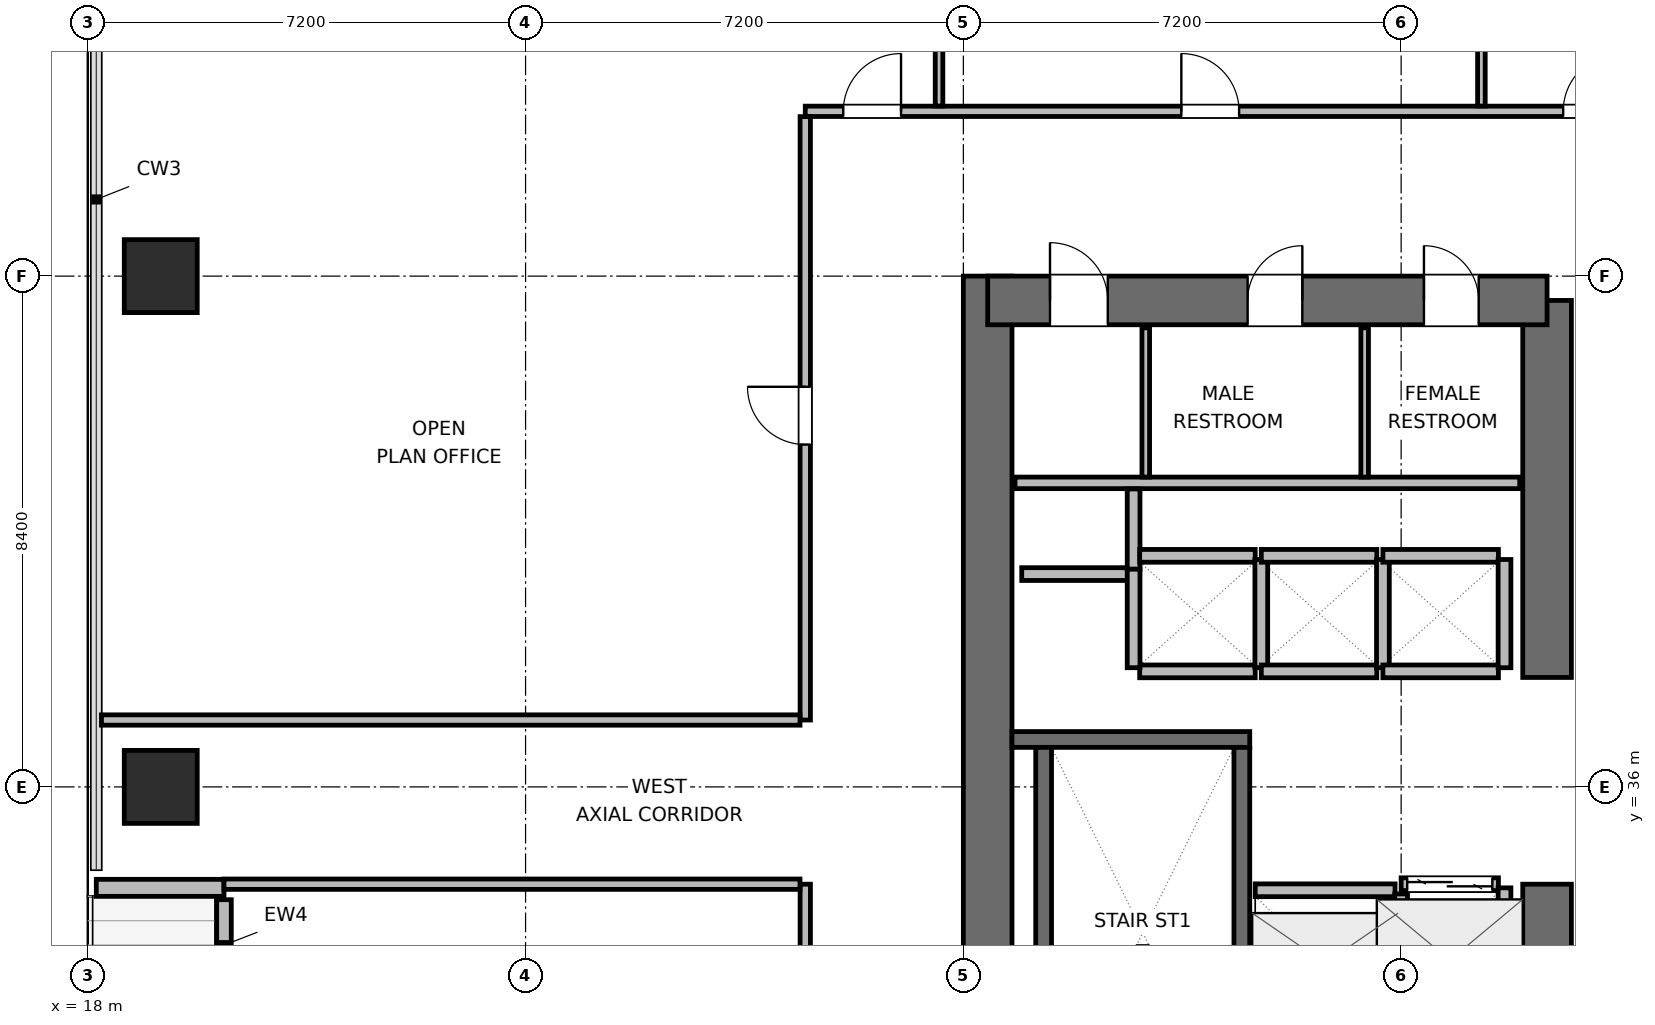
"""IFC4 building model, lengths in metres.
Left out: names, types, materials, properties, quantities, classifications, styles, units other than length and angle.
Written with IfcOpenShell. Run it as: python <this file> out.ifc"""

import sys

from ifc_helpers import new_model, si_unit, direction, frame, frame_2d, origin, origin_2d, place, context, subcontext, project, spatial, rectangle, extrude, element, fill, save


model = new_model("IFC4")
c1 = context("Model", 3, precision=1e-05, world=origin(), true_north=direction((0.0, 1.0)))
c2 = subcontext(c1, "Body", "Model", "MODEL_VIEW")
j1 = project(units=[si_unit("LENGTHUNIT", "METRE"), si_unit("PLANEANGLEUNIT", "RADIAN")], contexts=[c1])
p1 = place(None, origin())
s1 = spatial("IfcSite", under=j1, at=p1, CompositionType="ELEMENT")
p2 = place(p1, origin())
s2 = spatial("IfcBuilding", under=s1, at=p2, CompositionType="ELEMENT")
p3 = place(p2, frame((0.0, 0.0, 166.2)))
s3 = spatial("IfcBuildingStorey", under=s2, at=p3, CompositionType="ELEMENT", Elevation=166.2)
p4 = place(p3, frame((32.8, 27.6, 0.0), z_axis=(0.0, 0.0, 1.0), x_axis=(0.0, 1.0, 0.0)))
e1 = element("IfcWall", 1, at=p4, inside=s3, PredefinedType="SHEAR", context=c2, shape_type="SweptSolid", body=[
    extrude(rectangle(XDim=16.8, YDim=0.8, at=frame_2d((8.4, 0.0))), origin(), (0.0, 0.0, 1.0), 3.9),
])
p5 = place(p3, frame((42.0, 28.0, 0.0), z_axis=(0.0, 0.0, 1.0), x_axis=(0.0, 1.0, 0.0)))
e2 = element("IfcWall", 2, at=p5, inside=s3, PredefinedType="SHEAR", context=c2, shape_type="SweptSolid", body=[
    extrude(rectangle(XDim=6.4, YDim=0.8, at=frame_2d((3.2, 0.0))), origin(), (0.0, 0.0, 1.0), 3.9),
])
p6 = place(p3, frame((42.0, 37.8, 0.0), z_axis=(0.0, 0.0, 1.0), x_axis=(0.0, 1.0, 0.0)))
e3 = element("IfcWall", 3, at=p6, inside=s3, PredefinedType="SHEAR", context=c2, shape_type="SweptSolid", body=[
    extrude(rectangle(XDim=6.2, YDim=0.8, at=frame_2d((3.1, 0.0))), origin(), (0.0, 0.0, 1.0), 3.9),
])
p7 = place(p3, frame((32.8, 44.0, 0.0), z_axis=(0.0, 0.0, 1.0), x_axis=(1.0, 0.0, 0.0)))
e4 = element("IfcWall", 4, at=p7, inside=s3, PredefinedType="SHEAR", context=c2, shape_type="SweptSolid", body=[
    extrude(rectangle(XDim=9.2, YDim=0.8, at=frame_2d((4.6, 0.0))), origin(), (0.0, 0.0, 1.0), 3.9),
])
p8 = place(p7, frame((1.025, 0.0, 0.0)))
e5 = element("IfcOpeningElement", 5, at=p8, cuts=e4, PredefinedType="OPENING", context=c2, shape_type="SweptSolid", body=[
    extrude(rectangle(XDim=0.95, YDim=2.04, at=frame_2d((0.475, 1.02))), frame((0.0, 0.41, 0.0), z_axis=(0.0, -1.0, 0.0), x_axis=(1.0, 0.0, 0.0)), (0.0, 0.0, 1.0), 0.82),
])
p9 = place(p7, frame((4.275, 0.0, 0.0)))
e6 = element("IfcOpeningElement", 6, at=p9, cuts=e4, PredefinedType="OPENING", context=c2, shape_type="SweptSolid", body=[
    extrude(rectangle(XDim=0.9, YDim=2.02, at=frame_2d((0.45, 1.01))), frame((0.0, 0.41, 0.0), z_axis=(0.0, -1.0, 0.0), x_axis=(1.0, 0.0, 0.0)), (0.0, 0.0, 1.0), 0.82),
])
p10 = place(p7, frame((7.175, 0.0, 0.0)))
e7 = element("IfcOpeningElement", 7, at=p10, cuts=e4, PredefinedType="OPENING", context=c2, shape_type="SweptSolid", body=[
    extrude(rectangle(XDim=0.9, YDim=2.02, at=frame_2d((0.45, 1.01))), frame((0.0, 0.41, 0.0), z_axis=(0.0, -1.0, 0.0), x_axis=(1.0, 0.0, 0.0)), (0.0, 0.0, 1.0), 0.82),
])
p11 = place(p3, frame((33.2, 36.78, 0.0), z_axis=(0.0, 0.0, 1.0), x_axis=(1.0, 0.0, 0.0)))
e8 = element("IfcWall", 8, at=p11, inside=s3, PredefinedType="SHEAR", context=c2, shape_type="SweptSolid", body=[
    extrude(rectangle(XDim=3.91, YDim=0.26, at=frame_2d((1.955, 0.0))), origin(), (0.0, 0.0, 1.0), 3.9),
])
p12 = place(p3, frame((33.72, 29.05, 0.0), z_axis=(0.0, 0.0, 1.0), x_axis=(0.0, 1.0, 0.0)))
e9 = element("IfcWall", 9, at=p12, inside=s3, PredefinedType="SHEAR", context=c2, shape_type="SweptSolid", body=[
    extrude(rectangle(XDim=7.6, YDim=0.26, at=frame_2d((3.8, 0.0))), origin(), (0.0, 0.0, 1.0), 3.9),
])
p13 = place(p3, frame((36.98, 29.05, 0.0), z_axis=(0.0, 0.0, 1.0), x_axis=(0.0, 1.0, 0.0)))
e10 = element("IfcWall", 10, at=p13, inside=s3, PredefinedType="SHEAR", context=c2, shape_type="SweptSolid", body=[
    extrude(rectangle(XDim=7.6, YDim=0.26, at=frame_2d((3.8, 0.0))), origin(), (0.0, 0.0, 1.0), 3.9),
])
p14 = place(p13, frame((0.3, 0.0, 0.0)))
e11 = element("IfcOpeningElement", 11, at=p14, cuts=e10, PredefinedType="OPENING", context=c2, shape_type="SweptSolid", body=[
    extrude(rectangle(XDim=1.0, YDim=2.04, at=frame_2d((0.5, 1.02))), frame((0.0, 0.14, 0.0), z_axis=(0.0, -1.0, 0.0), x_axis=(1.0, 0.0, 0.0)), (0.0, 0.0, 1.0), 0.28),
])
for number, where, z_axis, x_axis in (
    (12, (19.2, 36.0, 0.0), (0.0, 0.0, 1.0), (1.0, 0.0, 0.0)),
    (13, (19.2, 44.4, 0.0), (0.0, 0.0, 1.0), (1.0, 0.0, 0.0)),
):
    element("IfcColumn", number, at=place(p3, frame(where, z_axis=z_axis, x_axis=x_axis)), inside=s3, PredefinedType="COLUMN", context=c2, shape_type="SweptSolid", body=[
        extrude(rectangle(XDim=1.2, YDim=1.2, at=origin_2d()), origin(), (0.0, 0.0, 1.0), 3.9),
    ])
p15 = place(p3, frame((20.24, 29.455, 0.0), z_axis=(0.0, 0.0, 1.0), x_axis=(0.0, 1.0, 0.0)))
e14 = element("IfcWall", 14, at=p15, inside=s3, PredefinedType="SOLIDWALL", context=c2, shape_type="SweptSolid", body=[
    extrude(rectangle(XDim=4.69, YDim=0.24, at=frame_2d((2.345, 0.0))), origin(), (0.0, 0.0, 1.0), 3.248),
])
p16 = place(p15, frame((1.845, 0.0, 0.0)))
e15 = element("IfcOpeningElement", 15, at=p16, cuts=e14, PredefinedType="OPENING", context=c2, shape_type="SweptSolid", body=[
    extrude(rectangle(XDim=1.0, YDim=2.02, at=frame_2d((0.5, 1.01))), frame((0.0, 0.13, 0.0), z_axis=(0.0, -1.0, 0.0), x_axis=(1.0, 0.0, 0.0)), (0.0, 0.0, 1.0), 0.26),
])
p17 = place(p3, frame((20.24, 34.34, 0.0), z_axis=(0.0, 0.0, 1.0), x_axis=(-1.0, 0.0, 0.0)))
e16 = element("IfcWall", 16, at=p17, inside=s3, PredefinedType="SOLIDWALL", context=c2, shape_type="SweptSolid", body=[
    extrude(rectangle(XDim=2.1, YDim=0.28, at=frame_2d((1.05, 0.0))), origin(), (0.0, 0.0, 1.0), 3.116),
])
p18 = place(p3, frame((33.25, 41.0, 0.0), z_axis=(0.0, 0.0, 1.0), x_axis=(1.0, 0.0, 0.0)))
e17 = element("IfcWall", 17, at=p18, inside=s3, PredefinedType="PLUMBINGWALL", context=c2, shape_type="SweptSolid", body=[
    extrude(rectangle(XDim=8.3, YDim=0.19, at=frame_2d((4.15, 0.0))), origin(), (0.0, 0.0, 1.0), 3.68),
])
for number, where, z_axis, x_axis in (
    (18, (35.4, 41.095, 0.0), (0.0, 0.0, 1.0), (0.0, 1.0, 0.0)),
    (19, (39.0, 41.095, 0.0), (0.0, 0.0, 1.0), (0.0, 1.0, 0.0)),
):
    element("IfcWall", number, at=place(p3, frame(where, z_axis=z_axis, x_axis=x_axis)), inside=s3, PredefinedType="PARTITIONING", context=c2, shape_type="SweptSolid", body=[
        extrude(rectangle(XDim=2.455, YDim=0.125, at=frame_2d((1.228, 0.0))), origin(), (0.0, 0.0, 1.0), 3.68),
    ])
p19 = place(p3, frame((33.36, 39.5, 0.0), z_axis=(0.0, 0.0, 1.0), x_axis=(1.0, 0.0, 0.0)))
e20 = element("IfcWall", 20, at=p19, inside=s3, PredefinedType="PARTITIONING", context=c2, shape_type="SweptSolid", body=[
    extrude(rectangle(XDim=1.86, YDim=0.21, at=frame_2d((0.93, 0.0))), origin(), (0.0, 0.0, 1.0), 3.68),
])
p20 = place(p3, frame((35.2, 39.58, 0.0), z_axis=(0.0, 0.0, 1.0), x_axis=(0.0, 1.0, 0.0)))
e21 = element("IfcWall", 21, at=p20, inside=s3, PredefinedType="PARTITIONING", context=c2, shape_type="SweptSolid", body=[
    extrude(rectangle(XDim=1.32, YDim=0.21, at=frame_2d((0.66, 0.0))), origin(), (0.0, 0.0, 1.0), 3.68),
])
p21 = place(p3, frame((37.2, 34.3, 0.0), z_axis=(0.0, 0.0, 1.0), x_axis=(1.0, 0.0, 0.0)))
e22 = element("IfcWall", 22, at=p21, inside=s3, PredefinedType="PARTITIONING", context=c2, shape_type="SweptSolid", body=[
    extrude(rectangle(XDim=2.3, YDim=0.21, at=frame_2d((1.15, 0.0))), origin(), (0.0, 0.0, 1.0), 3.68),
])
p22 = place(p3, frame((39.6, 31.96, 0.0), z_axis=(0.0, 0.0, 1.0), x_axis=(0.0, 1.0, 0.0)))
e23 = element("IfcWall", 23, at=p22, inside=s3, PredefinedType="PARTITIONING", context=c2, shape_type="SweptSolid", body=[
    extrude(rectangle(XDim=2.28, YDim=0.21, at=frame_2d((1.14, 0.0))), origin(), (0.0, 0.0, 1.0), 3.68),
])
p23 = place(p3, frame((39.6, 34.4, 0.0), z_axis=(0.0, 0.0, 1.0), x_axis=(1.0, 0.0, 0.0)))
e24 = element("IfcWall", 24, at=p23, inside=s3, PredefinedType="PARTITIONING", context=c2, shape_type="SweptSolid", body=[
    extrude(rectangle(XDim=1.6, YDim=0.21, at=frame_2d((0.8, 0.0))), origin(), (0.0, 0.0, 1.0), 3.68),
])
p24 = place(p23, frame((0.1, 0.0, 0.0)))
e25 = element("IfcOpeningElement", 25, at=p24, cuts=e24, PredefinedType="OPENING", context=c2, shape_type="SweptSolid", body=[
    extrude(rectangle(XDim=1.4, YDim=2.06, at=frame_2d((0.7, 1.03))), frame((0.0, 0.115, 0.0), z_axis=(0.0, -1.0, 0.0), x_axis=(1.0, 0.0, 0.0)), (0.0, 0.0, 1.0), 0.23),
])
p25 = place(p3, frame((41.3, 31.96, 0.0), z_axis=(0.0, 0.0, 1.0), x_axis=(0.0, 1.0, 0.0)))
e26 = element("IfcWall", 26, at=p25, inside=s3, PredefinedType="PARTITIONING", context=c2, shape_type="SweptSolid", body=[
    extrude(rectangle(XDim=2.38, YDim=0.21, at=frame_2d((1.19, 0.0))), origin(), (0.0, 0.0, 1.0), 3.68),
])
for number, where, z_axis, x_axis in (
    (27, (35.3, 37.9, 0.0), (0.0, 0.0, 1.0), (1.0, 0.0, 0.0)),
    (28, (35.3, 39.8, 0.0), (0.0, 0.0, 1.0), (1.0, 0.0, 0.0)),
):
    element("IfcWall", number, at=place(p3, frame(where, z_axis=z_axis, x_axis=x_axis)), inside=s3, PredefinedType="PARTITIONING", context=c2, shape_type="SweptSolid", body=[
        extrude(rectangle(XDim=1.9, YDim=0.21, at=frame_2d((0.95, 0.0))), origin(), (0.0, 0.0, 1.0), 3.68),
    ])
p26 = place(p3, frame((35.2, 37.96, 0.0), z_axis=(0.0, 0.0, 1.0), x_axis=(0.0, 1.0, 0.0)))
e29 = element("IfcWall", 29, at=p26, inside=s3, PredefinedType="PARTITIONING", context=c2, shape_type="SweptSolid", body=[
    extrude(rectangle(XDim=1.62, YDim=0.21, at=frame_2d((0.81, 0.0))), origin(), (0.0, 0.0, 1.0), 3.68),
])
p27 = place(p3, frame((37.3, 37.96, 0.0), z_axis=(0.0, 0.0, 1.0), x_axis=(0.0, 1.0, 0.0)))
e30 = element("IfcWall", 30, at=p27, inside=s3, PredefinedType="PARTITIONING", context=c2, shape_type="SweptSolid", body=[
    extrude(rectangle(XDim=1.78, YDim=0.21, at=frame_2d((0.89, 0.0))), origin(), (0.0, 0.0, 1.0), 3.68),
])
for number, where, z_axis, x_axis in (
    (31, (37.3, 37.9, 0.0), (0.0, 0.0, 1.0), (1.0, 0.0, 0.0)),
    (32, (37.3, 39.8, 0.0), (0.0, 0.0, 1.0), (1.0, 0.0, 0.0)),
):
    element("IfcWall", number, at=place(p3, frame(where, z_axis=z_axis, x_axis=x_axis)), inside=s3, PredefinedType="PARTITIONING", context=c2, shape_type="SweptSolid", body=[
        extrude(rectangle(XDim=1.9, YDim=0.21, at=frame_2d((0.95, 0.0))), origin(), (0.0, 0.0, 1.0), 3.68),
    ])
p28 = place(p3, frame((39.3, 37.96, 0.0), z_axis=(0.0, 0.0, 1.0), x_axis=(0.0, 1.0, 0.0)))
e33 = element("IfcWall", 33, at=p28, inside=s3, PredefinedType="PARTITIONING", context=c2, shape_type="SweptSolid", body=[
    extrude(rectangle(XDim=1.78, YDim=0.21, at=frame_2d((0.89, 0.0))), origin(), (0.0, 0.0, 1.0), 3.68),
])
for number, where, z_axis, x_axis in (
    (34, (39.3, 37.9, 0.0), (0.0, 0.0, 1.0), (1.0, 0.0, 0.0)),
    (35, (39.3, 39.8, 0.0), (0.0, 0.0, 1.0), (1.0, 0.0, 0.0)),
):
    element("IfcWall", number, at=place(p3, frame(where, z_axis=z_axis, x_axis=x_axis)), inside=s3, PredefinedType="PARTITIONING", context=c2, shape_type="SweptSolid", body=[
        extrude(rectangle(XDim=1.9, YDim=0.21, at=frame_2d((0.95, 0.0))), origin(), (0.0, 0.0, 1.0), 3.68),
    ])
p29 = place(p3, frame((41.3, 37.96, 0.0), z_axis=(0.0, 0.0, 1.0), x_axis=(0.0, 1.0, 0.0)))
e36 = element("IfcWall", 36, at=p29, inside=s3, PredefinedType="PARTITIONING", context=c2, shape_type="SweptSolid", body=[
    extrude(rectangle(XDim=1.78, YDim=0.21, at=frame_2d((0.89, 0.0))), origin(), (0.0, 0.0, 1.0), 3.68),
])
p30 = place(p3, frame((29.8, 47.11, 0.0), z_axis=(0.0, 0.0, 1.0), x_axis=(1.0, 0.0, 0.0)))
e37 = element("IfcWall", 37, at=p30, inside=s3, PredefinedType="PARTITIONING", context=c2, shape_type="SweptSolid", body=[
    extrude(rectangle(XDim=33.8, YDim=0.17, at=frame_2d((16.9, 0.0))), origin(), (0.0, 0.0, 1.0), 3.68),
])
p31 = place(p30, frame((0.625, 0.0, 0.0)))
e38 = element("IfcOpeningElement", 38, at=p31, cuts=e37, PredefinedType="OPENING", context=c2, shape_type="SweptSolid", body=[
    extrude(rectangle(XDim=0.95, YDim=2.04, at=frame_2d((0.475, 1.02))), frame((0.0, 0.095, 0.0), z_axis=(0.0, -1.0, 0.0), x_axis=(1.0, 0.0, 0.0)), (0.0, 0.0, 1.0), 0.19),
])
p32 = place(p30, frame((6.185, 0.0, 0.0)))
e39 = element("IfcOpeningElement", 39, at=p32, cuts=e37, PredefinedType="OPENING", context=c2, shape_type="SweptSolid", body=[
    extrude(rectangle(XDim=0.95, YDim=2.04, at=frame_2d((0.475, 1.02))), frame((0.0, 0.095, 0.0), z_axis=(0.0, -1.0, 0.0), x_axis=(1.0, 0.0, 0.0)), (0.0, 0.0, 1.0), 0.19),
])
p33 = place(p30, frame((12.465, 0.0, 0.0)))
e40 = element("IfcOpeningElement", 40, at=p33, cuts=e37, PredefinedType="OPENING", context=c2, shape_type="SweptSolid", body=[
    extrude(rectangle(XDim=0.95, YDim=2.04, at=frame_2d((0.475, 1.02))), frame((0.0, 0.095, 0.0), z_axis=(0.0, -1.0, 0.0), x_axis=(1.0, 0.0, 0.0)), (0.0, 0.0, 1.0), 0.19),
])
p34 = place(p30, frame((20.065, 0.0, 0.0)))
e41 = element("IfcOpeningElement", 41, at=p34, cuts=e37, PredefinedType="OPENING", context=c2, shape_type="SweptSolid", body=[
    extrude(rectangle(XDim=0.95, YDim=2.04, at=frame_2d((0.475, 1.02))), frame((0.0, 0.095, 0.0), z_axis=(0.0, -1.0, 0.0), x_axis=(1.0, 0.0, 0.0)), (0.0, 0.0, 1.0), 0.19),
])
p35 = place(p30, frame((29.585, 0.0, 0.0)))
e42 = element("IfcOpeningElement", 42, at=p35, cuts=e37, PredefinedType="OPENING", context=c2, shape_type="SweptSolid", body=[
    extrude(rectangle(XDim=0.95, YDim=2.04, at=frame_2d((0.475, 1.02))), frame((0.0, 0.095, 0.0), z_axis=(0.0, -1.0, 0.0), x_axis=(1.0, 0.0, 0.0)), (0.0, 0.0, 1.0), 0.19),
])
p36 = place(p3, frame((29.8, 24.977, 0.0), z_axis=(0.0, 0.0, 1.0), x_axis=(0.0, 1.0, 0.0)))
e43 = element("IfcWall", 43, at=p36, inside=s3, PredefinedType="PARTITIONING", context=c2, shape_type="SweptSolid", body=[
    extrude(rectangle(XDim=9.423, YDim=0.17, at=frame_2d((4.711, 0.0))), origin(), (0.0, 0.0, 1.0), 3.68),
])
p37 = place(p36, frame((4.193, 0.0, 0.0)))
e44 = element("IfcOpeningElement", 44, at=p37, cuts=e43, PredefinedType="OPENING", context=c2, shape_type="SweptSolid", body=[
    extrude(rectangle(XDim=0.95, YDim=2.04, at=frame_2d((0.475, 1.02))), frame((0.0, 0.095, 0.0), z_axis=(0.0, -1.0, 0.0), x_axis=(1.0, 0.0, 0.0)), (0.0, 0.0, 1.0), 0.19),
])
p38 = place(p3, frame((29.8, 37.1, 0.0), z_axis=(0.0, 0.0, 1.0), x_axis=(0.0, 1.0, 0.0)))
e45 = element("IfcWall", 45, at=p38, inside=s3, PredefinedType="PARTITIONING", context=c2, shape_type="SweptSolid", body=[
    extrude(rectangle(XDim=9.923, YDim=0.17, at=frame_2d((4.961, 0.0))), origin(), (0.0, 0.0, 1.0), 3.68),
])
p39 = place(p38, frame((4.53, 0.0, 0.0)))
e46 = element("IfcOpeningElement", 46, at=p39, cuts=e45, PredefinedType="OPENING", context=c2, shape_type="SweptSolid", body=[
    extrude(rectangle(XDim=0.95, YDim=2.04, at=frame_2d((0.475, 1.02))), frame((0.0, 0.095, 0.0), z_axis=(0.0, -1.0, 0.0), x_axis=(1.0, 0.0, 0.0)), (0.0, 0.0, 1.0), 0.19),
])
p40 = place(p3, frame((32.0, 47.197, 0.0), z_axis=(0.0, 0.0, 1.0), x_axis=(0.0, 1.0, 0.0)))
e47 = element("IfcWall", 47, at=p40, inside=s3, PredefinedType="PARTITIONING", context=c2, shape_type="SweptSolid", body=[
    extrude(rectangle(XDim=14.968, YDim=0.125, at=frame_2d((7.484, 0.0))), origin(), (0.0, 0.0, 1.0), 3.68),
])
p41 = place(p3, frame((40.92, 47.197, 0.0), z_axis=(0.0, 0.0, 1.0), x_axis=(0.0, 1.0, 0.0)))
e48 = element("IfcWall", 48, at=p41, inside=s3, PredefinedType="PARTITIONING", context=c2, shape_type="SweptSolid", body=[
    extrude(rectangle(XDim=14.968, YDim=0.125, at=frame_2d((7.484, 0.0))), origin(), (0.0, 0.0, 1.0), 3.043),
])
p42 = place(p3, frame((20.24, 34.4, 0.0), z_axis=(0.0, 0.0, 1.0), x_axis=(1.0, 0.0, 0.0)))
e49 = element("IfcWall", 49, at=p42, inside=s3, PredefinedType="PARTITIONING", context=c2, shape_type="SweptSolid", body=[
    extrude(rectangle(XDim=9.473, YDim=0.17, at=frame_2d((4.736, 0.0))), origin(), (0.0, 0.0, 1.0), 3.68),
])
p43 = place(p3, frame((18.225, 37.1, 0.0), z_axis=(0.0, 0.0, 1.0), x_axis=(1.0, 0.0, 0.0)))
e50 = element("IfcWall", 50, at=p43, inside=s3, PredefinedType="PARTITIONING", context=c2, shape_type="SweptSolid", body=[
    extrude(rectangle(XDim=11.488, YDim=0.17, at=frame_2d((5.744, 0.0))), origin(), (0.0, 0.0, 1.0), 3.68),
])
p44 = place(p24, origin())
e51 = element("IfcDoor", 51, at=p44, inside=s3, OperationType="DOUBLE_DOOR_SLIDING", PredefinedType="DOOR", context=c2, shape_type="SweptSolid", body=[
    extrude(rectangle(XDim=1.4, YDim=2.06, at=frame_2d((0.7, 1.03))), frame((0.0, 0.025, 0.0), z_axis=(0.0, -1.0, 0.0), x_axis=(1.0, 0.0, 0.0)), (0.0, 0.0, 1.0), 0.05),
])
fill(e25, e51)
p45 = place(p8, origin())
e52 = element("IfcDoor", 52, at=p45, inside=s3, OperationType="SINGLE_SWING_LEFT", PredefinedType="DOOR", context=c2, shape_type="SweptSolid", body=[
    extrude(rectangle(XDim=0.95, YDim=2.04, at=frame_2d((0.475, 1.02))), frame((0.0, 0.025, 0.0), z_axis=(0.0, -1.0, 0.0), x_axis=(1.0, 0.0, 0.0)), (0.0, 0.0, 1.0), 0.05),
])
fill(e5, e52)
p46 = place(p9, origin())
e53 = element("IfcDoor", 53, at=p46, inside=s3, OperationType="SINGLE_SWING_RIGHT", PredefinedType="DOOR", context=c2, shape_type="SweptSolid", body=[
    extrude(rectangle(XDim=0.9, YDim=2.02, at=frame_2d((0.45, 1.01))), frame((0.0, 0.025, 0.0), z_axis=(0.0, -1.0, 0.0), x_axis=(1.0, 0.0, 0.0)), (0.0, 0.0, 1.0), 0.05),
])
fill(e6, e53)
p47 = place(p10, origin())
e54 = element("IfcDoor", 54, at=p47, inside=s3, OperationType="SINGLE_SWING_LEFT", PredefinedType="DOOR", context=c2, shape_type="SweptSolid", body=[
    extrude(rectangle(XDim=0.9, YDim=2.02, at=frame_2d((0.45, 1.01))), frame((0.0, 0.025, 0.0), z_axis=(0.0, -1.0, 0.0), x_axis=(1.0, 0.0, 0.0)), (0.0, 0.0, 1.0), 0.05),
])
fill(e7, e54)
p48 = place(p31, origin())
e55 = element("IfcDoor", 55, at=p48, inside=s3, OperationType="SINGLE_SWING_RIGHT", PredefinedType="DOOR", context=c2, shape_type="SweptSolid", body=[
    extrude(rectangle(XDim=0.95, YDim=2.04, at=frame_2d((0.475, 1.02))), frame((0.0, 0.025, 0.0), z_axis=(0.0, -1.0, 0.0), x_axis=(1.0, 0.0, 0.0)), (0.0, 0.0, 1.0), 0.05),
])
fill(e38, e55)
p49 = place(p32, origin())
e56 = element("IfcDoor", 56, at=p49, inside=s3, OperationType="SINGLE_SWING_LEFT", PredefinedType="DOOR", context=c2, shape_type="SweptSolid", body=[
    extrude(rectangle(XDim=0.95, YDim=2.04, at=frame_2d((0.475, 1.02))), frame((0.0, 0.025, 0.0), z_axis=(0.0, -1.0, 0.0), x_axis=(1.0, 0.0, 0.0)), (0.0, 0.0, 1.0), 0.05),
])
fill(e39, e56)
p50 = place(p33, origin())
e57 = element("IfcDoor", 57, at=p50, inside=s3, OperationType="SINGLE_SWING_RIGHT", PredefinedType="DOOR", context=c2, shape_type="SweptSolid", body=[
    extrude(rectangle(XDim=0.95, YDim=2.04, at=frame_2d((0.475, 1.02))), frame((0.0, 0.025, 0.0), z_axis=(0.0, -1.0, 0.0), x_axis=(1.0, 0.0, 0.0)), (0.0, 0.0, 1.0), 0.05),
])
fill(e40, e57)
p51 = place(p39, origin())
e58 = element("IfcDoor", 58, at=p51, inside=s3, OperationType="SINGLE_SWING_RIGHT", PredefinedType="DOOR", context=c2, shape_type="SweptSolid", body=[
    extrude(rectangle(XDim=0.95, YDim=2.04, at=frame_2d((0.475, 1.02))), frame((0.0, 0.025, 0.0), z_axis=(0.0, -1.0, 0.0), x_axis=(1.0, 0.0, 0.0)), (0.0, 0.0, 1.0), 0.05),
])
fill(e46, e58)
save(model, sys.argv[1])
